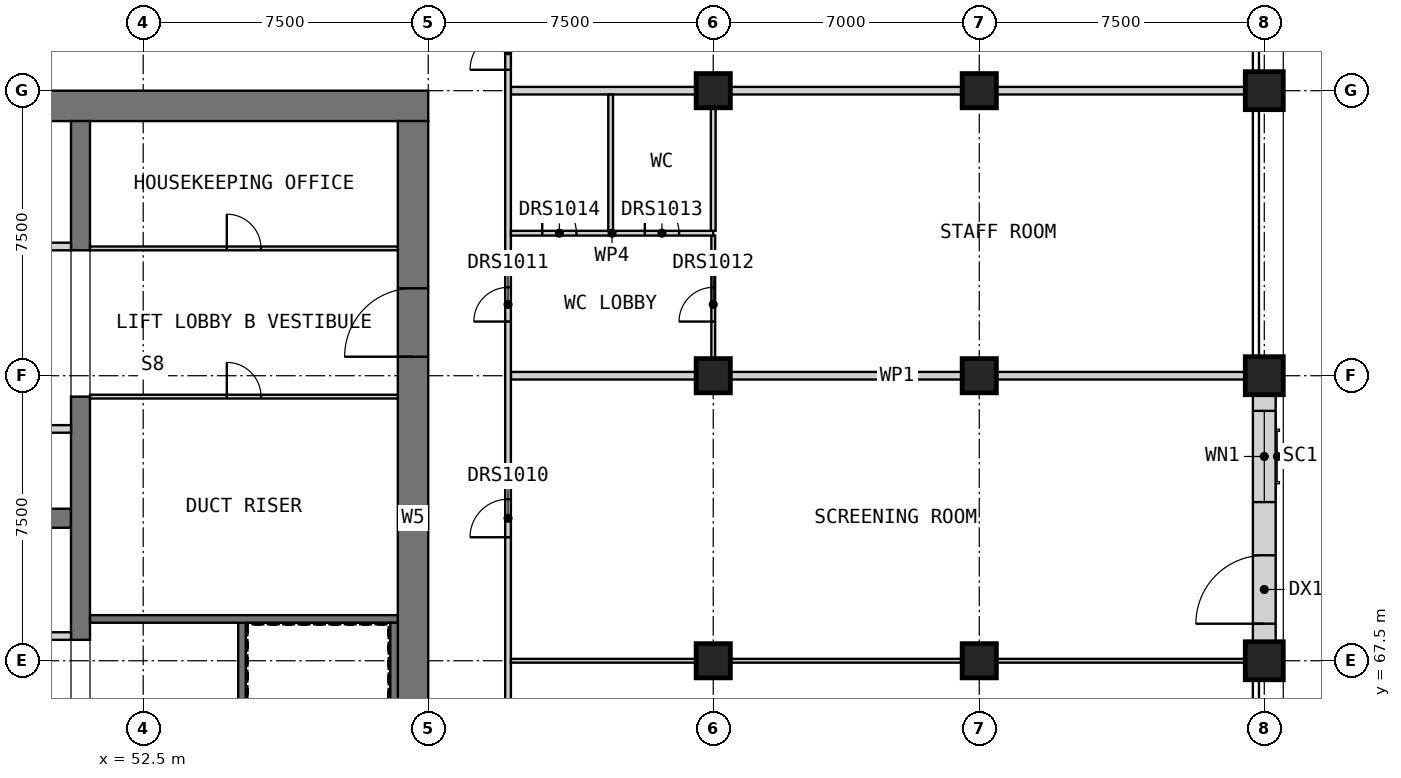
"""IFC4 building model, lengths in metres.
Left out: names, types, materials, properties, quantities, classifications, styles, units other than length and angle.
Written with IfcOpenShell. Run it as: python <this file> out.ifc"""

import sys

from ifc_helpers import new_model, si_unit, direction, frame, frame_2d, origin, origin_2d, place, context, subcontext, project, spatial, rectangle, extrude, element, fill, save


model = new_model("IFC4")
c1 = context("Model", 3, precision=1e-05, world=origin(), true_north=direction((0.0, 1.0)))
c2 = subcontext(c1, "Body", "Model", "MODEL_VIEW")
j1 = project(units=[si_unit("LENGTHUNIT", "METRE"), si_unit("PLANEANGLEUNIT", "RADIAN")], contexts=[c1])
p1 = place(None, origin())
s1 = spatial("IfcSite", under=j1, at=p1, CompositionType="ELEMENT")
p2 = place(p1, origin())
s2 = spatial("IfcBuilding", under=s1, at=p2, CompositionType="ELEMENT")
p3 = place(p2, frame((0.0, 0.0, 174.2)))
s3 = spatial("IfcBuildingStorey", under=s2, at=p3, CompositionType="ELEMENT", Elevation=174.2)
for number, where, z_axis, x_axis in (
    (1, (67.5, 67.5, 0.0), (0.0, 0.0, 1.0), (1.0, 0.0, 0.0)),
    (2, (67.5, 75.0, 0.0), (0.0, 0.0, 1.0), (1.0, 0.0, 0.0)),
    (3, (67.5, 82.5, 0.0), (0.0, 0.0, 1.0), (1.0, 0.0, 0.0)),
    (4, (74.5, 67.5, 0.0), (0.0, 0.0, 1.0), (1.0, 0.0, 0.0)),
    (5, (74.5, 75.0, 0.0), (0.0, 0.0, 1.0), (1.0, 0.0, 0.0)),
    (6, (74.5, 82.5, 0.0), (0.0, 0.0, 1.0), (1.0, 0.0, 0.0)),
):
    element("IfcColumn", number, at=place(p3, frame(where, z_axis=z_axis, x_axis=x_axis)), inside=s3, PredefinedType="COLUMN", context=c2, shape_type="SweptSolid", body=[
        extrude(rectangle(XDim=0.9, YDim=0.9, at=origin_2d()), origin(), (0.0, 0.0, 1.0), 5.0),
    ])
for number, where, z_axis, x_axis in (
    (7, (82.0, 67.5, 0.0), (0.0, 0.0, 1.0), (1.0, 0.0, 0.0)),
    (8, (82.0, 75.0, 0.0), (0.0, 0.0, 1.0), (1.0, 0.0, 0.0)),
    (9, (82.0, 82.5, 0.0), (0.0, 0.0, 1.0), (1.0, 0.0, 0.0)),
):
    element("IfcColumn", number, at=place(p3, frame(where, z_axis=z_axis, x_axis=x_axis)), inside=s3, PredefinedType="COLUMN", context=c2, shape_type="SweptSolid", body=[
        extrude(rectangle(XDim=1.0, YDim=1.0, at=origin_2d()), origin(), (0.0, 0.0, 1.0), 5.0),
    ])
p4 = place(p3, frame((30.0, 82.1, 0.0), z_axis=(0.0, 0.0, 1.0), x_axis=(1.0, 0.0, 0.0)))
e10 = element("IfcWall", 10, at=p4, inside=s3, PredefinedType="SHEAR", context=c2, shape_type="SweptSolid", body=[
    extrude(rectangle(XDim=30.0, YDim=0.8, at=frame_2d((15.0, 0.0))), origin(), (0.0, 0.0, 1.0), 5.0),
])
p5 = place(p3, frame((59.6, 60.8, 0.0), z_axis=(0.0, 0.0, 1.0), x_axis=(0.0, 1.0, 0.0)))
e11 = element("IfcWall", 11, at=p5, inside=s3, PredefinedType="SHEAR", context=c2, shape_type="SweptSolid", body=[
    extrude(rectangle(XDim=20.9, YDim=0.8, at=frame_2d((10.45, 0.0))), origin(), (0.0, 0.0, 1.0), 5.0),
])
p6 = place(p5, frame((14.7, 0.0, 0.0)))
e12 = element("IfcOpeningElement", 12, at=p6, cuts=e11, PredefinedType="OPENING", context=c2, shape_type="SweptSolid", body=[
    extrude(rectangle(XDim=1.8, YDim=2.1, at=frame_2d((0.9, 1.05))), frame((0.0, 0.41, 0.0), z_axis=(0.0, -1.0, 0.0), x_axis=(1.0, 0.0, 0.0)), (0.0, 0.0, 1.0), 0.82),
])
p7 = place(p3, frame((35.0, 71.25, 0.0), z_axis=(0.0, 0.0, 1.0), x_axis=(1.0, 0.0, 0.0)))
e13 = element("IfcWall", 13, at=p7, inside=s3, PredefinedType="SHEAR", context=c2, shape_type="SweptSolid", body=[
    extrude(rectangle(XDim=15.6, YDim=0.5, at=frame_2d((7.8, 0.0))), origin(), (0.0, 0.0, 1.0), 5.0),
])
p8 = place(p3, frame((50.85, 68.05, 0.0), z_axis=(0.0, 0.0, 1.0), x_axis=(0.0, 1.0, 0.0)))
e14 = element("IfcWall", 14, at=p8, inside=s3, PredefinedType="SHEAR", context=c2, shape_type="SweptSolid", body=[
    extrude(rectangle(XDim=6.4, YDim=0.5, at=frame_2d((3.2, 0.0))), origin(), (0.0, 0.0, 1.0), 5.0),
])
p9 = place(p3, frame((50.85, 78.3, 0.0), z_axis=(0.0, 0.0, 1.0), x_axis=(0.0, 1.0, 0.0)))
e15 = element("IfcWall", 15, at=p9, inside=s3, PredefinedType="SHEAR", context=c2, shape_type="SweptSolid", body=[
    extrude(rectangle(XDim=3.4, YDim=0.5, at=frame_2d((1.7, 0.0))), origin(), (0.0, 0.0, 1.0), 5.0),
])
p10 = place(p3, frame((82.0, 68.0, 0.0), z_axis=(0.0, 0.0, 1.0), x_axis=(0.0, 1.0, 0.0)))
e16 = element("IfcWall", 16, at=p10, inside=s3, PredefinedType="SOLIDWALL", context=c2, shape_type="SweptSolid", body=[
    extrude(rectangle(XDim=6.5, YDim=0.6, at=frame_2d((3.25, 0.0))), origin(), (0.0, 0.0, 1.0), 4.25),
])
p11 = place(p10, frame((0.475, 0.0, 0.0)))
e17 = element("IfcOpeningElement", 17, at=p11, cuts=e16, PredefinedType="OPENING", context=c2, shape_type="SweptSolid", body=[
    extrude(rectangle(XDim=1.8, YDim=2.4, at=frame_2d((0.9, 1.2))), frame((0.0, 0.31, 0.0), z_axis=(0.0, -1.0, 0.0), x_axis=(1.0, 0.0, 0.0)), (0.0, 0.0, 1.0), 0.62),
])
p12 = place(p10, frame((3.675, 0.0, 0.8)))
e18 = element("IfcOpeningElement", 18, at=p12, cuts=e16, PredefinedType="OPENING", context=c2, shape_type="SweptSolid", body=[
    extrude(rectangle(XDim=2.4, YDim=1.8, at=frame_2d((1.2, 0.9))), frame((0.0, 0.31, 0.0), z_axis=(0.0, -1.0, 0.0), x_axis=(1.0, 0.0, 0.0)), (0.0, 0.0, 1.0), 0.62),
])
p13 = place(p3, frame((35.0, 68.15, 0.0), z_axis=(0.0, 0.0, 1.0), x_axis=(1.0, 0.0, 0.0)))
e19 = element("IfcWall", 19, at=p13, inside=s3, PredefinedType="PARTITIONING", context=c2, shape_type="SweptSolid", body=[
    extrude(rectangle(XDim=15.6, YDim=0.2, at=frame_2d((7.8, 0.0))), origin(), (0.0, 0.0, 1.0), 4.75),
])
p14 = place(p13, frame((1.5, 0.0, 0.0)))
e20 = element("IfcOpeningElement", 20, at=p14, cuts=e19, PredefinedType="OPENING", context=c2, shape_type="SweptSolid", body=[
    extrude(rectangle(XDim=0.9, YDim=2.1, at=frame_2d((0.45, 1.05))), frame((0.0, 0.11, 0.0), z_axis=(0.0, -1.0, 0.0), x_axis=(1.0, 0.0, 0.0)), (0.0, 0.0, 1.0), 0.22),
])
p15 = place(p13, frame((7.35, 0.0, 0.0)))
e21 = element("IfcOpeningElement", 21, at=p15, cuts=e19, PredefinedType="OPENING", context=c2, shape_type="SweptSolid", body=[
    extrude(rectangle(XDim=0.9, YDim=2.1, at=frame_2d((0.45, 1.05))), frame((0.0, 0.11, 0.0), z_axis=(0.0, -1.0, 0.0), x_axis=(1.0, 0.0, 0.0)), (0.0, 0.0, 1.0), 0.22),
])
p16 = place(p13, frame((13.2, 0.0, 0.0)))
e22 = element("IfcOpeningElement", 22, at=p16, cuts=e19, PredefinedType="OPENING", context=c2, shape_type="SweptSolid", body=[
    extrude(rectangle(XDim=0.9, YDim=2.1, at=frame_2d((0.45, 1.05))), frame((0.0, 0.11, 0.0), z_axis=(0.0, -1.0, 0.0), x_axis=(1.0, 0.0, 0.0)), (0.0, 0.0, 1.0), 0.22),
])
p17 = place(p3, frame((35.0, 73.6, 0.0), z_axis=(0.0, 0.0, 1.0), x_axis=(1.0, 0.0, 0.0)))
e23 = element("IfcWall", 23, at=p17, inside=s3, PredefinedType="SOLIDWALL", context=c2, shape_type="SweptSolid", body=[
    extrude(rectangle(XDim=15.6, YDim=0.2, at=frame_2d((7.8, 0.0))), origin(), (0.0, 0.0, 1.0), 5.0),
])
p18 = place(p17, frame((0.75, 0.0, 0.0)))
e24 = element("IfcOpeningElement", 24, at=p18, cuts=e23, PredefinedType="OPENING", context=c2, shape_type="SweptSolid", body=[
    extrude(rectangle(XDim=1.1, YDim=2.1, at=frame_2d((0.55, 1.05))), frame((0.0, 0.11, 0.0), z_axis=(0.0, -1.0, 0.0), x_axis=(1.0, 0.0, 0.0)), (0.0, 0.0, 1.0), 0.22),
])
p19 = place(p17, frame((3.35, 0.0, 0.0)))
e25 = element("IfcOpeningElement", 25, at=p19, cuts=e23, PredefinedType="OPENING", context=c2, shape_type="SweptSolid", body=[
    extrude(rectangle(XDim=1.1, YDim=2.1, at=frame_2d((0.55, 1.05))), frame((0.0, 0.11, 0.0), z_axis=(0.0, -1.0, 0.0), x_axis=(1.0, 0.0, 0.0)), (0.0, 0.0, 1.0), 0.22),
])
p20 = place(p17, frame((5.95, 0.0, 0.0)))
e26 = element("IfcOpeningElement", 26, at=p20, cuts=e23, PredefinedType="OPENING", context=c2, shape_type="SweptSolid", body=[
    extrude(rectangle(XDim=1.1, YDim=2.1, at=frame_2d((0.55, 1.05))), frame((0.0, 0.11, 0.0), z_axis=(0.0, -1.0, 0.0), x_axis=(1.0, 0.0, 0.0)), (0.0, 0.0, 1.0), 0.22),
])
p21 = place(p17, frame((8.55, 0.0, 0.0)))
e27 = element("IfcOpeningElement", 27, at=p21, cuts=e23, PredefinedType="OPENING", context=c2, shape_type="SweptSolid", body=[
    extrude(rectangle(XDim=1.1, YDim=2.1, at=frame_2d((0.55, 1.05))), frame((0.0, 0.11, 0.0), z_axis=(0.0, -1.0, 0.0), x_axis=(1.0, 0.0, 0.0)), (0.0, 0.0, 1.0), 0.22),
])
p22 = place(p17, frame((11.15, 0.0, 0.0)))
e28 = element("IfcOpeningElement", 28, at=p22, cuts=e23, PredefinedType="OPENING", context=c2, shape_type="SweptSolid", body=[
    extrude(rectangle(XDim=1.1, YDim=2.1, at=frame_2d((0.55, 1.05))), frame((0.0, 0.11, 0.0), z_axis=(0.0, -1.0, 0.0), x_axis=(1.0, 0.0, 0.0)), (0.0, 0.0, 1.0), 0.22),
])
p23 = place(p17, frame((13.75, 0.0, 0.0)))
e29 = element("IfcOpeningElement", 29, at=p23, cuts=e23, PredefinedType="OPENING", context=c2, shape_type="SweptSolid", body=[
    extrude(rectangle(XDim=1.1, YDim=2.1, at=frame_2d((0.55, 1.05))), frame((0.0, 0.11, 0.0), z_axis=(0.0, -1.0, 0.0), x_axis=(1.0, 0.0, 0.0)), (0.0, 0.0, 1.0), 0.22),
])
p24 = place(p3, frame((35.0, 78.4, 0.0), z_axis=(0.0, 0.0, 1.0), x_axis=(1.0, 0.0, 0.0)))
e30 = element("IfcWall", 30, at=p24, inside=s3, PredefinedType="SOLIDWALL", context=c2, shape_type="SweptSolid", body=[
    extrude(rectangle(XDim=15.6, YDim=0.2, at=frame_2d((7.8, 0.0))), origin(), (0.0, 0.0, 1.0), 5.0),
])
p25 = place(p24, frame((0.75, 0.0, 0.0)))
e31 = element("IfcOpeningElement", 31, at=p25, cuts=e30, PredefinedType="OPENING", context=c2, shape_type="SweptSolid", body=[
    extrude(rectangle(XDim=1.1, YDim=2.1, at=frame_2d((0.55, 1.05))), frame((0.0, 0.11, 0.0), z_axis=(0.0, -1.0, 0.0), x_axis=(1.0, 0.0, 0.0)), (0.0, 0.0, 1.0), 0.22),
])
p26 = place(p24, frame((3.35, 0.0, 0.0)))
e32 = element("IfcOpeningElement", 32, at=p26, cuts=e30, PredefinedType="OPENING", context=c2, shape_type="SweptSolid", body=[
    extrude(rectangle(XDim=1.1, YDim=2.1, at=frame_2d((0.55, 1.05))), frame((0.0, 0.11, 0.0), z_axis=(0.0, -1.0, 0.0), x_axis=(1.0, 0.0, 0.0)), (0.0, 0.0, 1.0), 0.22),
])
p27 = place(p24, frame((11.15, 0.0, 0.0)))
e33 = element("IfcOpeningElement", 33, at=p27, cuts=e30, PredefinedType="OPENING", context=c2, shape_type="SweptSolid", body=[
    extrude(rectangle(XDim=1.1, YDim=2.1, at=frame_2d((0.55, 1.05))), frame((0.0, 0.11, 0.0), z_axis=(0.0, -1.0, 0.0), x_axis=(1.0, 0.0, 0.0)), (0.0, 0.0, 1.0), 0.22),
])
p28 = place(p24, frame((13.75, 0.0, 0.0)))
e34 = element("IfcOpeningElement", 34, at=p28, cuts=e30, PredefinedType="OPENING", context=c2, shape_type="SweptSolid", body=[
    extrude(rectangle(XDim=1.1, YDim=2.1, at=frame_2d((0.55, 1.05))), frame((0.0, 0.11, 0.0), z_axis=(0.0, -1.0, 0.0), x_axis=(1.0, 0.0, 0.0)), (0.0, 0.0, 1.0), 0.22),
])
p29 = place(p3, frame((55.1, 60.8, 0.0), z_axis=(0.0, 0.0, 1.0), x_axis=(0.0, 1.0, 0.0)))
e35 = element("IfcWall", 35, at=p29, inside=s3, PredefinedType="SOLIDWALL", context=c2, shape_type="SweptSolid", body=[
    extrude(rectangle(XDim=7.8, YDim=0.2, at=frame_2d((3.9, 0.0))), origin(), (0.0, 0.0, 1.0), 4.75),
])
p30 = place(p3, frame((51.1, 68.6, 0.0), z_axis=(0.0, 0.0, 1.0), x_axis=(1.0, 0.0, 0.0)))
e36 = element("IfcWall", 36, at=p30, inside=s3, PredefinedType="SOLIDWALL", context=c2, shape_type="SweptSolid", body=[
    extrude(rectangle(XDim=8.1, YDim=0.2, at=frame_2d((4.05, 0.0))), origin(), (0.0, 0.0, 1.0), 4.75),
])
p31 = place(p3, frame((59.1, 60.8, 0.0), z_axis=(0.0, 0.0, 1.0), x_axis=(0.0, 1.0, 0.0)))
e37 = element("IfcWall", 37, at=p31, inside=s3, PredefinedType="SOLIDWALL", context=c2, shape_type="SweptSolid", body=[
    extrude(rectangle(XDim=7.7, YDim=0.2, at=frame_2d((3.85, 0.0))), origin(), (0.0, 0.0, 1.0), 4.75),
])
p32 = place(p3, frame((51.1, 74.45, 0.0), z_axis=(0.0, 0.0, 1.0), x_axis=(1.0, 0.0, 0.0)))
e38 = element("IfcWall", 38, at=p32, inside=s3, PredefinedType="PARTITIONING", context=c2, shape_type="SweptSolid", body=[
    extrude(rectangle(XDim=8.1, YDim=0.1, at=frame_2d((4.05, 0.0))), origin(), (0.0, 0.0, 1.0), 4.75),
])
p33 = place(p32, frame((3.6, 0.0, 0.0)))
e39 = element("IfcOpeningElement", 39, at=p33, cuts=e38, PredefinedType="OPENING", context=c2, shape_type="SweptSolid", body=[
    extrude(rectangle(XDim=0.9, YDim=2.1, at=frame_2d((0.45, 1.05))), frame((0.0, 0.06, 0.0), z_axis=(0.0, -1.0, 0.0), x_axis=(1.0, 0.0, 0.0)), (0.0, 0.0, 1.0), 0.12),
])
p34 = place(p3, frame((51.1, 78.35, 0.0), z_axis=(0.0, 0.0, 1.0), x_axis=(1.0, 0.0, 0.0)))
e40 = element("IfcWall", 40, at=p34, inside=s3, PredefinedType="PARTITIONING", context=c2, shape_type="SweptSolid", body=[
    extrude(rectangle(XDim=8.1, YDim=0.1, at=frame_2d((4.05, 0.0))), origin(), (0.0, 0.0, 1.0), 4.75),
])
p35 = place(p34, frame((3.6, 0.0, 0.0)))
e41 = element("IfcOpeningElement", 41, at=p35, cuts=e40, PredefinedType="OPENING", context=c2, shape_type="SweptSolid", body=[
    extrude(rectangle(XDim=0.9, YDim=2.1, at=frame_2d((0.45, 1.05))), frame((0.0, 0.06, 0.0), z_axis=(0.0, -1.0, 0.0), x_axis=(1.0, 0.0, 0.0)), (0.0, 0.0, 1.0), 0.12),
])
for number, where, z_axis, x_axis in (
    (42, (62.175, 75.0, 0.0), (0.0, 0.0, 1.0), (1.0, 0.0, 0.0)),
    (43, (62.175, 82.5, 0.0), (0.0, 0.0, 1.0), (1.0, 0.0, 0.0)),
):
    element("IfcWall", number, at=place(p3, frame(where, z_axis=z_axis, x_axis=x_axis)), inside=s3, PredefinedType="PARTITIONING", context=c2, shape_type="SweptSolid", body=[
        extrude(rectangle(XDim=20.325, YDim=0.2, at=frame_2d((10.163, 0.0))), origin(), (0.0, 0.0, 1.0), 4.75),
    ])
p36 = place(p3, frame((62.1, 57.975, 0.0), z_axis=(0.0, 0.0, 1.0), x_axis=(0.0, 1.0, 0.0)))
e44 = element("IfcWall", 44, at=p36, inside=s3, PredefinedType="PARTITIONING", context=c2, shape_type="SweptSolid", body=[
    extrude(rectangle(XDim=26.55, YDim=0.15, at=frame_2d((13.275, 0.0))), origin(), (0.0, 0.0, 1.0), 4.75),
])
p37 = place(p36, frame((25.075, 0.0, 0.0)))
e45 = element("IfcOpeningElement", 45, at=p37, cuts=e44, PredefinedType="OPENING", context=c2, shape_type="SweptSolid", body=[
    extrude(rectangle(XDim=1.0, YDim=2.1, at=frame_2d((0.5, 1.05))), frame((0.0, 0.085, 0.0), z_axis=(0.0, -1.0, 0.0), x_axis=(1.0, 0.0, 0.0)), (0.0, 0.0, 1.0), 0.17),
])
p38 = place(p36, frame((5.275, 0.0, 0.0)))
e46 = element("IfcOpeningElement", 46, at=p38, cuts=e44, PredefinedType="OPENING", context=c2, shape_type="SweptSolid", body=[
    extrude(rectangle(XDim=1.0, YDim=2.1, at=frame_2d((0.5, 1.05))), frame((0.0, 0.085, 0.0), z_axis=(0.0, -1.0, 0.0), x_axis=(1.0, 0.0, 0.0)), (0.0, 0.0, 1.0), 0.17),
])
p39 = place(p36, frame((12.775, 0.0, 0.0)))
e47 = element("IfcOpeningElement", 47, at=p39, cuts=e44, PredefinedType="OPENING", context=c2, shape_type="SweptSolid", body=[
    extrude(rectangle(XDim=1.0, YDim=2.1, at=frame_2d((0.5, 1.05))), frame((0.0, 0.085, 0.0), z_axis=(0.0, -1.0, 0.0), x_axis=(1.0, 0.0, 0.0)), (0.0, 0.0, 1.0), 0.17),
])
p40 = place(p36, frame((18.45, 0.0, 0.0)))
e48 = element("IfcOpeningElement", 48, at=p40, cuts=e44, PredefinedType="OPENING", context=c2, shape_type="SweptSolid", body=[
    extrude(rectangle(XDim=0.9, YDim=2.1, at=frame_2d((0.45, 1.05))), frame((0.0, 0.085, 0.0), z_axis=(0.0, -1.0, 0.0), x_axis=(1.0, 0.0, 0.0)), (0.0, 0.0, 1.0), 0.17),
])
p41 = place(p3, frame((62.175, 67.5, 0.0), z_axis=(0.0, 0.0, 1.0), x_axis=(1.0, 0.0, 0.0)))
e49 = element("IfcWall", 49, at=p41, inside=s3, PredefinedType="PARTITIONING", context=c2, shape_type="SweptSolid", body=[
    extrude(rectangle(XDim=20.325, YDim=0.1, at=frame_2d((10.163, 0.0))), origin(), (0.0, 0.0, 1.0), 4.75),
])
p42 = place(p3, frame((67.5, 75.1, 0.0), z_axis=(0.0, 0.0, 1.0), x_axis=(0.0, 1.0, 0.0)))
e50 = element("IfcWall", 50, at=p42, inside=s3, PredefinedType="PARTITIONING", context=c2, shape_type="SweptSolid", body=[
    extrude(rectangle(XDim=3.587, YDim=0.1, at=frame_2d((1.794, 0.0))), origin(), (0.0, 0.0, 1.0), 4.75),
])
p43 = place(p42, frame((1.325, 0.0, 0.0)))
e51 = element("IfcOpeningElement", 51, at=p43, cuts=e50, PredefinedType="OPENING", context=c2, shape_type="SweptSolid", body=[
    extrude(rectangle(XDim=0.9, YDim=2.1, at=frame_2d((0.45, 1.05))), frame((0.0, 0.06, 0.0), z_axis=(0.0, -1.0, 0.0), x_axis=(1.0, 0.0, 0.0)), (0.0, 0.0, 1.0), 0.12),
])
p44 = place(p3, frame((62.175, 78.75, 0.0), z_axis=(0.0, 0.0, 1.0), x_axis=(1.0, 0.0, 0.0)))
e52 = element("IfcWall", 52, at=p44, inside=s3, PredefinedType="PARTITIONING", context=c2, shape_type="SweptSolid", body=[
    extrude(rectangle(XDim=5.325, YDim=0.125, at=frame_2d((2.663, 0.0))), origin(), (0.0, 0.0, 1.0), 4.75),
])
p45 = place(p44, frame((3.525, 0.0, 0.0)))
e53 = element("IfcOpeningElement", 53, at=p45, cuts=e52, PredefinedType="OPENING", context=c2, shape_type="SweptSolid", body=[
    extrude(rectangle(XDim=0.9, YDim=2.1, at=frame_2d((0.45, 1.05))), frame((0.0, 0.073, 0.0), z_axis=(0.0, -1.0, 0.0), x_axis=(1.0, 0.0, 0.0)), (0.0, 0.0, 1.0), 0.145),
])
p46 = place(p44, frame((0.825, 0.0, 0.0)))
e54 = element("IfcOpeningElement", 54, at=p46, cuts=e52, PredefinedType="OPENING", context=c2, shape_type="SweptSolid", body=[
    extrude(rectangle(XDim=0.9, YDim=2.1, at=frame_2d((0.45, 1.05))), frame((0.0, 0.073, 0.0), z_axis=(0.0, -1.0, 0.0), x_axis=(1.0, 0.0, 0.0)), (0.0, 0.0, 1.0), 0.145),
])
for number, where, z_axis, x_axis in (
    (55, (64.8, 78.812, 0.0), (0.0, 0.0, 1.0), (0.0, 1.0, 0.0)),
    (56, (67.5, 78.812, 0.0), (0.0, 0.0, 1.0), (0.0, 1.0, 0.0)),
):
    element("IfcWall", number, at=place(p3, frame(where, z_axis=z_axis, x_axis=x_axis)), inside=s3, PredefinedType="PARTITIONING", context=c2, shape_type="SweptSolid", body=[
        extrude(rectangle(XDim=3.587, YDim=0.125, at=frame_2d((1.794, 0.0))), origin(), (0.0, 0.0, 1.0), 4.75),
    ])
p47 = place(p11, origin())
e57 = element("IfcDoor", 57, at=p47, inside=s3, OperationType="SINGLE_SWING_LEFT", PredefinedType="DOOR", context=c2, shape_type="SweptSolid", body=[
    extrude(rectangle(XDim=1.8, YDim=2.4, at=frame_2d((0.9, 1.2))), frame((0.0, -0.075, 0.0), z_axis=(0.0, -1.0, 0.0), x_axis=(1.0, 0.0, 0.0)), (0.0, 0.0, 1.0), 0.05),
])
fill(e17, e57)
p48 = place(p12, origin())
e58 = element("IfcWindow", 58, at=p48, inside=s3, PartitioningType="SINGLE_PANEL", PredefinedType="WINDOW", context=c2, shape_type="SweptSolid", body=[
    extrude(rectangle(XDim=2.4, YDim=1.8, at=frame_2d((1.2, 0.9))), frame((0.0, -0.07, 0.0), z_axis=(0.0, -1.0, 0.0), x_axis=(1.0, 0.0, 0.0)), (0.0, 0.0, 1.0), 0.06),
])
fill(e18, e58)
p49 = place(p6, origin())
e59 = element("IfcDoor", 59, at=p49, inside=s3, OperationType="DOUBLE_DOOR_SINGLE_SWING", PredefinedType="DOOR", context=c2, shape_type="SweptSolid", body=[
    extrude(rectangle(XDim=1.8, YDim=2.1, at=frame_2d((0.9, 1.05))), frame((0.0, 0.025, 0.0), z_axis=(0.0, -1.0, 0.0), x_axis=(1.0, 0.0, 0.0)), (0.0, 0.0, 1.0), 0.05),
])
fill(e12, e59)
p50 = place(p33, origin())
e60 = element("IfcDoor", 60, at=p50, inside=s3, OperationType="SINGLE_SWING_RIGHT", PredefinedType="DOOR", context=c2, shape_type="SweptSolid", body=[
    extrude(rectangle(XDim=0.9, YDim=2.1, at=frame_2d((0.45, 1.05))), frame((0.0, 0.025, 0.0), z_axis=(0.0, -1.0, 0.0), x_axis=(1.0, 0.0, 0.0)), (0.0, 0.0, 1.0), 0.05),
])
fill(e39, e60)
p51 = place(p35, origin())
e61 = element("IfcDoor", 61, at=p51, inside=s3, OperationType="SINGLE_SWING_RIGHT", PredefinedType="DOOR", context=c2, shape_type="SweptSolid", body=[
    extrude(rectangle(XDim=0.9, YDim=2.1, at=frame_2d((0.45, 1.05))), frame((0.0, 0.025, 0.0), z_axis=(0.0, -1.0, 0.0), x_axis=(1.0, 0.0, 0.0)), (0.0, 0.0, 1.0), 0.05),
])
fill(e41, e61)
p52 = place(p37, origin())
e62 = element("IfcDoor", 62, at=p52, inside=s3, OperationType="SINGLE_SWING_RIGHT", PredefinedType="DOOR", context=c2, shape_type="SweptSolid", body=[
    extrude(rectangle(XDim=1.0, YDim=2.1, at=frame_2d((0.5, 1.05))), frame((0.0, 0.025, 0.0), z_axis=(0.0, -1.0, 0.0), x_axis=(1.0, 0.0, 0.0)), (0.0, 0.0, 1.0), 0.05),
])
fill(e45, e62)
p53 = place(p39, origin())
e63 = element("IfcDoor", 63, at=p53, inside=s3, OperationType="SINGLE_SWING_RIGHT", PredefinedType="DOOR", context=c2, shape_type="SweptSolid", body=[
    extrude(rectangle(XDim=1.0, YDim=2.1, at=frame_2d((0.5, 1.05))), frame((0.0, 0.025, 0.0), z_axis=(0.0, -1.0, 0.0), x_axis=(1.0, 0.0, 0.0)), (0.0, 0.0, 1.0), 0.05),
])
fill(e47, e63)
p54 = place(p40, origin())
e64 = element("IfcDoor", 64, at=p54, inside=s3, OperationType="SINGLE_SWING_RIGHT", PredefinedType="DOOR", context=c2, shape_type="SweptSolid", body=[
    extrude(rectangle(XDim=0.9, YDim=2.1, at=frame_2d((0.45, 1.05))), frame((0.0, 0.025, 0.0), z_axis=(0.0, -1.0, 0.0), x_axis=(1.0, 0.0, 0.0)), (0.0, 0.0, 1.0), 0.05),
])
fill(e48, e64)
p55 = place(p43, origin())
e65 = element("IfcDoor", 65, at=p55, inside=s3, OperationType="SINGLE_SWING_LEFT", PredefinedType="DOOR", context=c2, shape_type="SweptSolid", body=[
    extrude(rectangle(XDim=0.9, YDim=2.1, at=frame_2d((0.45, 1.05))), frame((0.0, 0.025, 0.0), z_axis=(0.0, -1.0, 0.0), x_axis=(1.0, 0.0, 0.0)), (0.0, 0.0, 1.0), 0.05),
])
fill(e51, e65)
p56 = place(p45, origin())
e66 = element("IfcDoor", 66, at=p56, inside=s3, OperationType="SINGLE_SWING_LEFT", PredefinedType="DOOR", context=c2, shape_type="SweptSolid", body=[
    extrude(rectangle(XDim=0.9, YDim=2.1, at=frame_2d((0.45, 1.05))), frame((0.0, 0.025, 0.0), z_axis=(0.0, -1.0, 0.0), x_axis=(1.0, 0.0, 0.0)), (0.0, 0.0, 1.0), 0.05),
])
fill(e53, e66)
p57 = place(p46, origin())
e67 = element("IfcDoor", 67, at=p57, inside=s3, OperationType="SINGLE_SWING_RIGHT", PredefinedType="DOOR", context=c2, shape_type="SweptSolid", body=[
    extrude(rectangle(XDim=0.9, YDim=2.1, at=frame_2d((0.45, 1.05))), frame((0.0, 0.025, 0.0), z_axis=(0.0, -1.0, 0.0), x_axis=(1.0, 0.0, 0.0)), (0.0, 0.0, 1.0), 0.05),
])
fill(e54, e67)
save(model, sys.argv[1])
